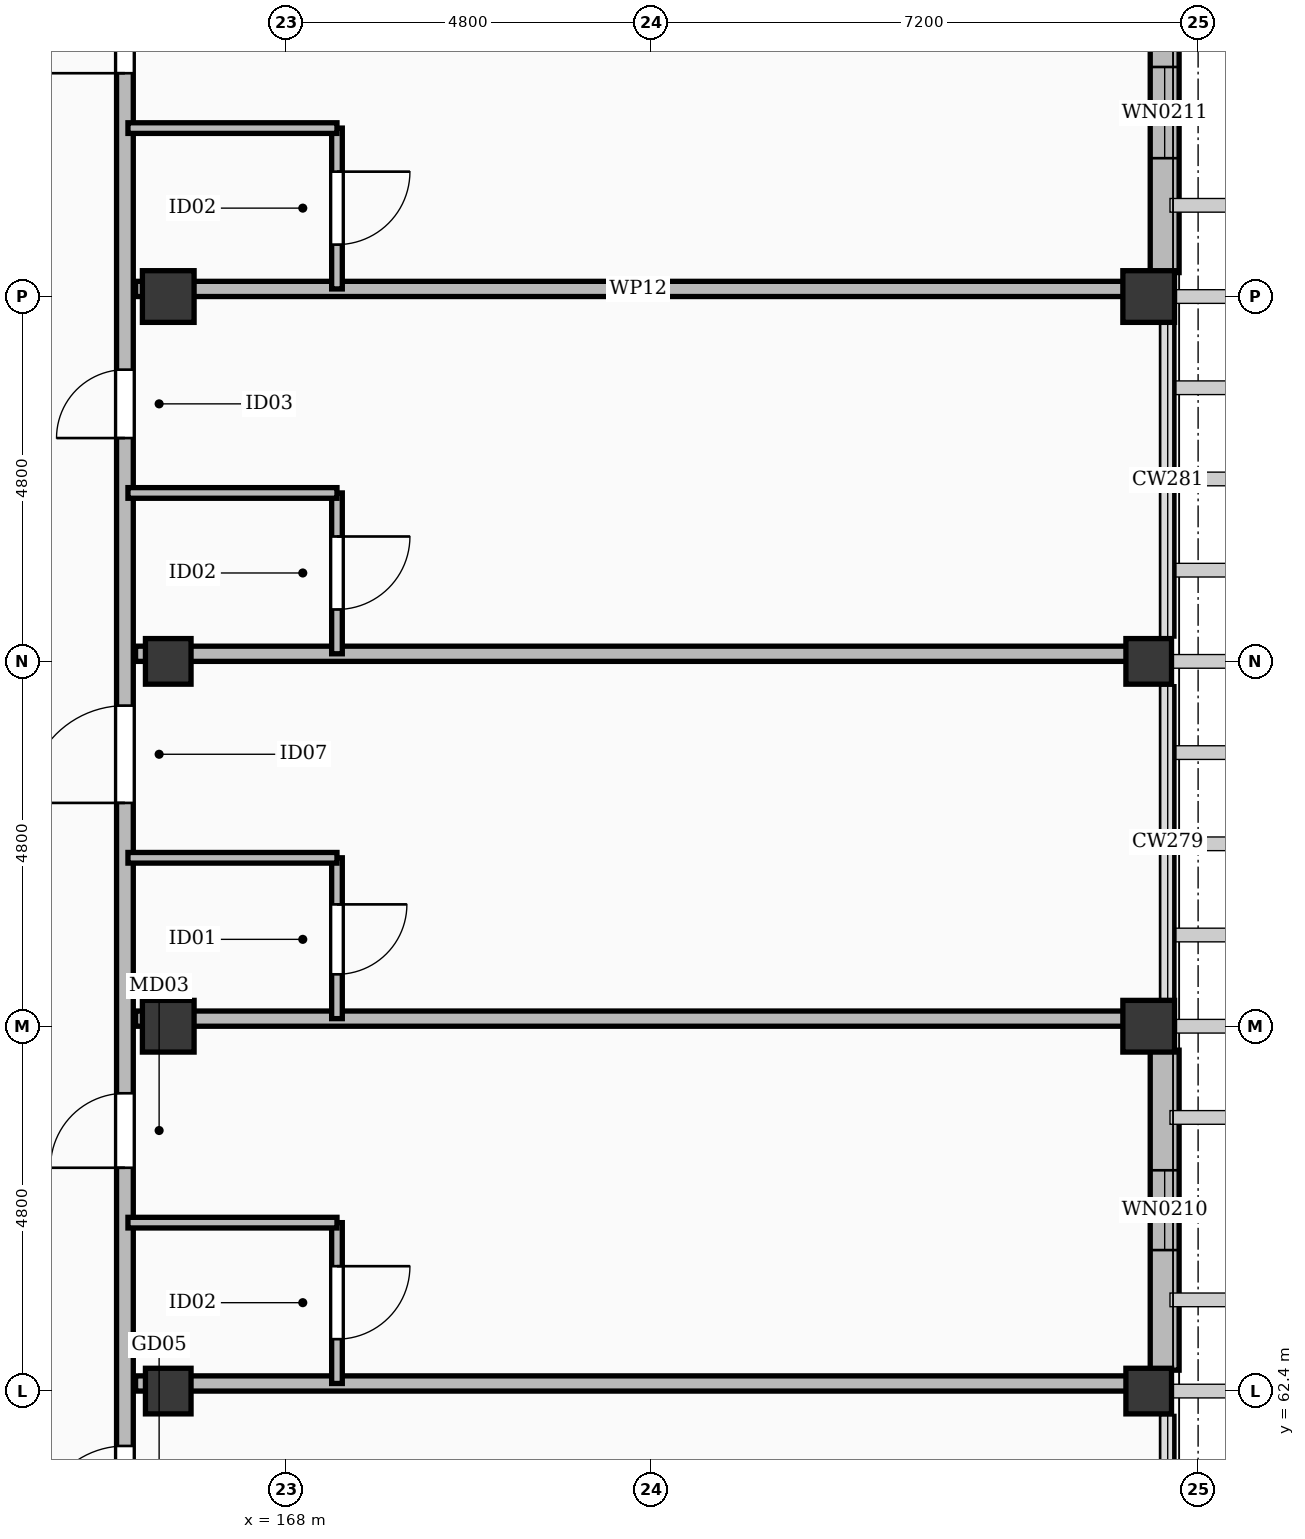
"""IFC4 building model, lengths in metres.
Left out: names, types, materials, properties, quantities, classifications, styles, units other than length and angle.
Written with IfcOpenShell. Run it as: python <this file> out.ifc"""

import sys

from ifc_helpers import new_model, si_unit, direction, frame, frame_2d, origin, origin_2d, place, context, subcontext, project, spatial, rectangle, extrude, element, fill, save


model = new_model("IFC4")
c1 = context("Model", 3, precision=1e-05, world=origin(), true_north=direction((0.0, 1.0)))
c2 = subcontext(c1, "Body", "Model", "MODEL_VIEW")
j1 = project(units=[si_unit("LENGTHUNIT", "METRE"), si_unit("PLANEANGLEUNIT", "RADIAN")], contexts=[c1])
p1 = place(None, origin())
s1 = spatial("IfcSite", under=j1, at=p1, CompositionType="ELEMENT")
p2 = place(p1, origin())
s2 = spatial("IfcBuilding", under=s1, at=p2, CompositionType="ELEMENT")
p3 = place(p2, frame((0.0, 0.0, 35.4)))
s3 = spatial("IfcBuildingStorey", under=s2, at=p3, CompositionType="ELEMENT", Elevation=35.4)
for number, where, z_axis, x_axis in (
    (1, (166.45, 67.2, 0.0), (0.0, 0.0, 1.0), (1.0, 0.0, 0.0)),
    (2, (166.45, 76.8, 0.0), (0.0, 0.0, 1.0), (1.0, 0.0, 0.0)),
    (3, (179.35, 67.2, 0.0), (0.0, 0.0, 1.0), (1.0, 0.0, 0.0)),
    (4, (179.35, 76.8, 0.0), (0.0, 0.0, 1.0), (1.0, 0.0, 0.0)),
):
    element("IfcColumn", number, at=place(p3, frame(where, z_axis=z_axis, x_axis=x_axis)), inside=s3, PredefinedType="COLUMN", context=c2, shape_type="SweptSolid", body=[
        extrude(rectangle(XDim=0.68, YDim=0.68, at=origin_2d()), origin(), (0.0, 0.0, 1.0), 3.6),
    ])
for number, where, z_axis, x_axis in (
    (5, (166.45, 62.4, 0.0), (0.0, 0.0, 1.0), (1.0, 0.0, 0.0)),
    (6, (166.45, 72.0, 0.0), (0.0, 0.0, 1.0), (1.0, 0.0, 0.0)),
    (7, (179.35, 62.4, 0.0), (0.0, 0.0, 1.0), (1.0, 0.0, 0.0)),
    (8, (179.35, 72.0, 0.0), (0.0, 0.0, 1.0), (1.0, 0.0, 0.0)),
):
    element("IfcColumn", number, at=place(p3, frame(where, z_axis=z_axis, x_axis=x_axis)), inside=s3, PredefinedType="COLUMN", context=c2, shape_type="SweptSolid", body=[
        extrude(rectangle(XDim=0.6, YDim=0.6, at=origin_2d()), origin(), (0.0, 0.0, 1.0), 3.6),
    ])
p4 = place(p3, frame((179.56, 66.885, 0.0), z_axis=(0.0, 0.0, 1.0), x_axis=(0.0, -1.0, 0.0)))
e9 = element("IfcWall", 9, at=p4, inside=s3, PredefinedType="SOLIDWALL", context=c2, shape_type="SweptSolid", body=[
    extrude(rectangle(XDim=4.21, YDim=0.38, at=frame_2d((2.105, 0.0))), origin(), (0.0, 0.0, 1.0), 2.602),
])
p5 = place(p4, frame((1.58, 0.0, 0.55)))
e10 = element("IfcOpeningElement", 10, at=p5, cuts=e9, PredefinedType="OPENING", context=c2, shape_type="SweptSolid", body=[
    extrude(rectangle(XDim=1.05, YDim=1.65, at=frame_2d((0.525, 0.825))), frame((0.0, 0.202, 0.0), z_axis=(0.0, -1.0, 0.0), x_axis=(1.0, 0.0, 0.0)), (0.0, 0.0, 1.0), 0.404),
])
p6 = place(p3, frame((179.56, 81.325, 0.0), z_axis=(0.0, 0.0, 1.0), x_axis=(0.0, -1.0, 0.0)))
e11 = element("IfcWall", 11, at=p6, inside=s3, PredefinedType="SOLIDWALL", context=c2, shape_type="SweptSolid", body=[
    extrude(rectangle(XDim=4.21, YDim=0.38, at=frame_2d((2.105, 0.0))), origin(), (0.0, 0.0, 1.0), 2.602),
])
p7 = place(p6, frame((1.505, 0.0, 0.55)))
e12 = element("IfcOpeningElement", 12, at=p7, cuts=e11, PredefinedType="OPENING", context=c2, shape_type="SweptSolid", body=[
    extrude(rectangle(XDim=1.2, YDim=1.72, at=frame_2d((0.6, 0.86))), frame((0.0, 0.202, 0.0), z_axis=(0.0, -1.0, 0.0), x_axis=(1.0, 0.0, 0.0)), (0.0, 0.0, 1.0), 0.404),
])
p8 = place(p3, frame((165.88, 53.15, 0.0), z_axis=(0.0, 0.0, 1.0), x_axis=(0.0, 1.0, 0.0)))
e13 = element("IfcWall", 13, at=p8, inside=s3, PredefinedType="PARTITIONING", context=c2, shape_type="SweptSolid", body=[
    extrude(rectangle(XDim=72.5, YDim=0.22, at=frame_2d((36.25, 0.0))), origin(), (0.0, 0.0, 1.0), 2.602),
])
p9 = place(p8, frame((0.691, 0.0, 0.0)))
e14 = element("IfcOpeningElement", 14, at=p9, cuts=e13, PredefinedType="OPENING", context=c2, shape_type="SweptSolid", body=[
    extrude(rectangle(XDim=1.02, YDim=2.2, at=frame_2d((0.51, 1.1))), frame((0.0, 0.122, 0.0), z_axis=(0.0, -1.0, 0.0), x_axis=(1.0, 0.0, 0.0)), (0.0, 0.0, 1.0), 0.244),
])
p10 = place(p8, frame((7.388, 0.0, 0.0)))
e15 = element("IfcOpeningElement", 15, at=p10, cuts=e13, PredefinedType="OPENING", context=c2, shape_type="SweptSolid", body=[
    extrude(rectangle(XDim=1.14, YDim=2.26, at=frame_2d((0.57, 1.13))), frame((0.0, 0.122, 0.0), z_axis=(0.0, -1.0, 0.0), x_axis=(1.0, 0.0, 0.0)), (0.0, 0.0, 1.0), 0.244),
])
p11 = place(p8, frame((12.188, 0.0, 0.0)))
e16 = element("IfcOpeningElement", 16, at=p11, cuts=e13, PredefinedType="OPENING", context=c2, shape_type="SweptSolid", body=[
    extrude(rectangle(XDim=0.98, YDim=2.15, at=frame_2d((0.49, 1.075))), frame((0.0, 0.122, 0.0), z_axis=(0.0, -1.0, 0.0), x_axis=(1.0, 0.0, 0.0)), (0.0, 0.0, 1.0), 0.244),
])
p12 = place(p8, frame((16.988, 0.0, 0.0)))
e17 = element("IfcOpeningElement", 17, at=p12, cuts=e13, PredefinedType="OPENING", context=c2, shape_type="SweptSolid", body=[
    extrude(rectangle(XDim=1.28, YDim=2.16, at=frame_2d((0.64, 1.08))), frame((0.0, 0.122, 0.0), z_axis=(0.0, -1.0, 0.0), x_axis=(1.0, 0.0, 0.0)), (0.0, 0.0, 1.0), 0.244),
])
p13 = place(p8, frame((21.788, 0.0, 0.0)))
e18 = element("IfcOpeningElement", 18, at=p13, cuts=e13, PredefinedType="OPENING", context=c2, shape_type="SweptSolid", body=[
    extrude(rectangle(XDim=0.9, YDim=2.08, at=frame_2d((0.45, 1.04))), frame((0.0, 0.122, 0.0), z_axis=(0.0, -1.0, 0.0), x_axis=(1.0, 0.0, 0.0)), (0.0, 0.0, 1.0), 0.244),
])
p14 = place(p8, frame((26.588, 0.0, 0.0)))
e19 = element("IfcOpeningElement", 19, at=p14, cuts=e13, PredefinedType="OPENING", context=c2, shape_type="SweptSolid", body=[
    extrude(rectangle(XDim=1.05, YDim=2.22, at=frame_2d((0.525, 1.11))), frame((0.0, 0.122, 0.0), z_axis=(0.0, -1.0, 0.0), x_axis=(1.0, 0.0, 0.0)), (0.0, 0.0, 1.0), 0.244),
])
p15 = place(p8, frame((31.388, 0.0, 0.0)))
e20 = element("IfcOpeningElement", 20, at=p15, cuts=e13, PredefinedType="OPENING", context=c2, shape_type="SweptSolid", body=[
    extrude(rectangle(XDim=1.02, YDim=2.2, at=frame_2d((0.51, 1.1))), frame((0.0, 0.122, 0.0), z_axis=(0.0, -1.0, 0.0), x_axis=(1.0, 0.0, 0.0)), (0.0, 0.0, 1.0), 0.244),
])
p16 = place(p8, frame((36.188, 0.0, 0.0)))
e21 = element("IfcOpeningElement", 21, at=p16, cuts=e13, PredefinedType="OPENING", context=c2, shape_type="SweptSolid", body=[
    extrude(rectangle(XDim=1.14, YDim=2.26, at=frame_2d((0.57, 1.13))), frame((0.0, 0.122, 0.0), z_axis=(0.0, -1.0, 0.0), x_axis=(1.0, 0.0, 0.0)), (0.0, 0.0, 1.0), 0.244),
])
p17 = place(p8, frame((40.988, 0.0, 0.0)))
e22 = element("IfcOpeningElement", 22, at=p17, cuts=e13, PredefinedType="OPENING", context=c2, shape_type="SweptSolid", body=[
    extrude(rectangle(XDim=0.98, YDim=2.15, at=frame_2d((0.49, 1.075))), frame((0.0, 0.122, 0.0), z_axis=(0.0, -1.0, 0.0), x_axis=(1.0, 0.0, 0.0)), (0.0, 0.0, 1.0), 0.244),
])
p18 = place(p8, frame((45.788, 0.0, 0.0)))
e23 = element("IfcOpeningElement", 23, at=p18, cuts=e13, PredefinedType="OPENING", context=c2, shape_type="SweptSolid", body=[
    extrude(rectangle(XDim=1.28, YDim=2.16, at=frame_2d((0.64, 1.08))), frame((0.0, 0.122, 0.0), z_axis=(0.0, -1.0, 0.0), x_axis=(1.0, 0.0, 0.0)), (0.0, 0.0, 1.0), 0.244),
])
p19 = place(p8, frame((50.588, 0.0, 0.0)))
e24 = element("IfcOpeningElement", 24, at=p19, cuts=e13, PredefinedType="OPENING", context=c2, shape_type="SweptSolid", body=[
    extrude(rectangle(XDim=0.9, YDim=2.08, at=frame_2d((0.45, 1.04))), frame((0.0, 0.122, 0.0), z_axis=(0.0, -1.0, 0.0), x_axis=(1.0, 0.0, 0.0)), (0.0, 0.0, 1.0), 0.244),
])
p20 = place(p8, frame((55.388, 0.0, 0.0)))
e25 = element("IfcOpeningElement", 25, at=p20, cuts=e13, PredefinedType="OPENING", context=c2, shape_type="SweptSolid", body=[
    extrude(rectangle(XDim=1.05, YDim=2.22, at=frame_2d((0.525, 1.11))), frame((0.0, 0.122, 0.0), z_axis=(0.0, -1.0, 0.0), x_axis=(1.0, 0.0, 0.0)), (0.0, 0.0, 1.0), 0.244),
])
p21 = place(p8, frame((60.188, 0.0, 0.0)))
e26 = element("IfcOpeningElement", 26, at=p21, cuts=e13, PredefinedType="OPENING", context=c2, shape_type="SweptSolid", body=[
    extrude(rectangle(XDim=1.02, YDim=2.2, at=frame_2d((0.51, 1.1))), frame((0.0, 0.122, 0.0), z_axis=(0.0, -1.0, 0.0), x_axis=(1.0, 0.0, 0.0)), (0.0, 0.0, 1.0), 0.244),
])
p22 = place(p8, frame((64.988, 0.0, 0.0)))
e27 = element("IfcOpeningElement", 27, at=p22, cuts=e13, PredefinedType="OPENING", context=c2, shape_type="SweptSolid", body=[
    extrude(rectangle(XDim=1.14, YDim=2.26, at=frame_2d((0.57, 1.13))), frame((0.0, 0.122, 0.0), z_axis=(0.0, -1.0, 0.0), x_axis=(1.0, 0.0, 0.0)), (0.0, 0.0, 1.0), 0.244),
])
p23 = place(p8, frame((69.788, 0.0, 0.0)))
e28 = element("IfcOpeningElement", 28, at=p23, cuts=e13, PredefinedType="OPENING", context=c2, shape_type="SweptSolid", body=[
    extrude(rectangle(XDim=0.98, YDim=2.15, at=frame_2d((0.49, 1.075))), frame((0.0, 0.122, 0.0), z_axis=(0.0, -1.0, 0.0), x_axis=(1.0, 0.0, 0.0)), (0.0, 0.0, 1.0), 0.244),
])
p24 = place(p3, frame((166.02, 62.5, 0.0), z_axis=(0.0, 0.0, 1.0), x_axis=(1.0, 0.0, 0.0)))
e29 = element("IfcWall", 29, at=p24, inside=s3, PredefinedType="PARTITIONING", context=c2, shape_type="SweptSolid", body=[
    extrude(rectangle(XDim=13.23, YDim=0.2, at=frame_2d((6.615, 0.0))), origin(), (0.0, 0.0, 1.0), 2.602),
])
p25 = place(p3, frame((168.67, 62.5, 0.0), z_axis=(0.0, 0.0, 1.0), x_axis=(0.0, 1.0, 0.0)))
e30 = element("IfcWall", 30, at=p25, inside=s3, PredefinedType="PARTITIONING", context=c2, shape_type="SweptSolid", body=[
    extrude(rectangle(XDim=2.116, YDim=0.14, at=frame_2d((1.058, 0.0))), origin(), (0.0, 0.0, 1.0), 2.732),
])
p26 = place(p25, frame((0.583, 0.0, 0.0)))
e31 = element("IfcOpeningElement", 31, at=p26, cuts=e30, PredefinedType="OPENING", context=c2, shape_type="SweptSolid", body=[
    extrude(rectangle(XDim=0.96, YDim=2.12, at=frame_2d((0.48, 1.06))), frame((0.0, 0.082, 0.0), z_axis=(0.0, -1.0, 0.0), x_axis=(1.0, 0.0, 0.0)), (0.0, 0.0, 1.0), 0.164),
])
p27 = place(p3, frame((165.92, 64.616, 0.0), z_axis=(0.0, 0.0, 1.0), x_axis=(1.0, 0.0, 0.0)))
e32 = element("IfcWall", 32, at=p27, inside=s3, PredefinedType="PARTITIONING", context=c2, shape_type="SweptSolid", body=[
    extrude(rectangle(XDim=2.75, YDim=0.14, at=frame_2d((1.375, 0.0))), origin(), (0.0, 0.0, 1.0), 2.732),
])
p28 = place(p3, frame((166.02, 67.3, 0.0), z_axis=(0.0, 0.0, 1.0), x_axis=(1.0, 0.0, 0.0)))
e33 = element("IfcWall", 33, at=p28, inside=s3, PredefinedType="PARTITIONING", context=c2, shape_type="SweptSolid", body=[
    extrude(rectangle(XDim=13.23, YDim=0.2, at=frame_2d((6.615, 0.0))), origin(), (0.0, 0.0, 1.0), 2.602),
])
p29 = place(p3, frame((168.67, 67.3, 0.0), z_axis=(0.0, 0.0, 1.0), x_axis=(0.0, 1.0, 0.0)))
e34 = element("IfcWall", 34, at=p29, inside=s3, PredefinedType="PARTITIONING", context=c2, shape_type="SweptSolid", body=[
    extrude(rectangle(XDim=2.116, YDim=0.14, at=frame_2d((1.058, 0.0))), origin(), (0.0, 0.0, 1.0), 2.732),
])
p30 = place(p29, frame((0.583, 0.0, 0.0)))
e35 = element("IfcOpeningElement", 35, at=p30, cuts=e34, PredefinedType="OPENING", context=c2, shape_type="SweptSolid", body=[
    extrude(rectangle(XDim=0.92, YDim=2.1, at=frame_2d((0.46, 1.05))), frame((0.0, 0.082, 0.0), z_axis=(0.0, -1.0, 0.0), x_axis=(1.0, 0.0, 0.0)), (0.0, 0.0, 1.0), 0.164),
])
p31 = place(p3, frame((165.92, 69.416, 0.0), z_axis=(0.0, 0.0, 1.0), x_axis=(1.0, 0.0, 0.0)))
e36 = element("IfcWall", 36, at=p31, inside=s3, PredefinedType="PARTITIONING", context=c2, shape_type="SweptSolid", body=[
    extrude(rectangle(XDim=2.75, YDim=0.14, at=frame_2d((1.375, 0.0))), origin(), (0.0, 0.0, 1.0), 2.732),
])
p32 = place(p3, frame((166.02, 72.1, 0.0), z_axis=(0.0, 0.0, 1.0), x_axis=(1.0, 0.0, 0.0)))
e37 = element("IfcWall", 37, at=p32, inside=s3, PredefinedType="PARTITIONING", context=c2, shape_type="SweptSolid", body=[
    extrude(rectangle(XDim=13.23, YDim=0.2, at=frame_2d((6.615, 0.0))), origin(), (0.0, 0.0, 1.0), 2.602),
])
p33 = place(p3, frame((168.67, 72.1, 0.0), z_axis=(0.0, 0.0, 1.0), x_axis=(0.0, 1.0, 0.0)))
e38 = element("IfcWall", 38, at=p33, inside=s3, PredefinedType="PARTITIONING", context=c2, shape_type="SweptSolid", body=[
    extrude(rectangle(XDim=2.116, YDim=0.14, at=frame_2d((1.058, 0.0))), origin(), (0.0, 0.0, 1.0), 2.732),
])
p34 = place(p33, frame((0.583, 0.0, 0.0)))
e39 = element("IfcOpeningElement", 39, at=p34, cuts=e38, PredefinedType="OPENING", context=c2, shape_type="SweptSolid", body=[
    extrude(rectangle(XDim=0.96, YDim=2.12, at=frame_2d((0.48, 1.06))), frame((0.0, 0.082, 0.0), z_axis=(0.0, -1.0, 0.0), x_axis=(1.0, 0.0, 0.0)), (0.0, 0.0, 1.0), 0.164),
])
p35 = place(p3, frame((165.92, 74.216, 0.0), z_axis=(0.0, 0.0, 1.0), x_axis=(1.0, 0.0, 0.0)))
e40 = element("IfcWall", 40, at=p35, inside=s3, PredefinedType="PARTITIONING", context=c2, shape_type="SweptSolid", body=[
    extrude(rectangle(XDim=2.75, YDim=0.14, at=frame_2d((1.375, 0.0))), origin(), (0.0, 0.0, 1.0), 2.732),
])
p36 = place(p3, frame((166.02, 76.9, 0.0), z_axis=(0.0, 0.0, 1.0), x_axis=(1.0, 0.0, 0.0)))
e41 = element("IfcWall", 41, at=p36, inside=s3, PredefinedType="PARTITIONING", context=c2, shape_type="SweptSolid", body=[
    extrude(rectangle(XDim=13.23, YDim=0.2, at=frame_2d((6.615, 0.0))), origin(), (0.0, 0.0, 1.0), 2.602),
])
p37 = place(p3, frame((168.67, 76.9, 0.0), z_axis=(0.0, 0.0, 1.0), x_axis=(0.0, 1.0, 0.0)))
e42 = element("IfcWall", 42, at=p37, inside=s3, PredefinedType="PARTITIONING", context=c2, shape_type="SweptSolid", body=[
    extrude(rectangle(XDim=2.116, YDim=0.14, at=frame_2d((1.058, 0.0))), origin(), (0.0, 0.0, 1.0), 2.732),
])
p38 = place(p37, frame((0.583, 0.0, 0.0)))
e43 = element("IfcOpeningElement", 43, at=p38, cuts=e42, PredefinedType="OPENING", context=c2, shape_type="SweptSolid", body=[
    extrude(rectangle(XDim=0.96, YDim=2.12, at=frame_2d((0.48, 1.06))), frame((0.0, 0.082, 0.0), z_axis=(0.0, -1.0, 0.0), x_axis=(1.0, 0.0, 0.0)), (0.0, 0.0, 1.0), 0.164),
])
p39 = place(p3, frame((165.92, 79.016, 0.0), z_axis=(0.0, 0.0, 1.0), x_axis=(1.0, 0.0, 0.0)))
e44 = element("IfcWall", 44, at=p39, inside=s3, PredefinedType="PARTITIONING", context=c2, shape_type="SweptSolid", body=[
    extrude(rectangle(XDim=2.75, YDim=0.14, at=frame_2d((1.375, 0.0))), origin(), (0.0, 0.0, 1.0), 2.732),
])
p40 = place(p5, origin())
e45 = element("IfcWindow", 45, at=p40, inside=s3, PartitioningType="SINGLE_PANEL", PredefinedType="WINDOW", context=c2, shape_type="SweptSolid", body=[
    extrude(rectangle(XDim=1.05, YDim=1.65, at=frame_2d((0.525, 0.825))), frame((0.0, 0.03, 0.0), z_axis=(0.0, -1.0, 0.0), x_axis=(1.0, 0.0, 0.0)), (0.0, 0.0, 1.0), 0.06),
])
fill(e10, e45)
p41 = place(p7, origin())
e46 = element("IfcWindow", 46, at=p41, inside=s3, PartitioningType="SINGLE_PANEL", PredefinedType="WINDOW", context=c2, shape_type="SweptSolid", body=[
    extrude(rectangle(XDim=1.2, YDim=1.72, at=frame_2d((0.6, 0.86))), frame((0.0, 0.03, 0.0), z_axis=(0.0, -1.0, 0.0), x_axis=(1.0, 0.0, 0.0)), (0.0, 0.0, 1.0), 0.06),
])
fill(e12, e46)
p42 = place(p10, origin())
e47 = element("IfcDoor", 47, at=p42, inside=s3, OperationType="SINGLE_SWING_LEFT", PredefinedType="DOOR", context=c2, shape_type="SweptSolid", body=[
    extrude(rectangle(XDim=1.14, YDim=2.26, at=frame_2d((0.57, 1.13))), frame((0.0, 0.025, 0.0), z_axis=(0.0, -1.0, 0.0), x_axis=(1.0, 0.0, 0.0)), (0.0, 0.0, 1.0), 0.05),
])
fill(e15, e47)
p43 = place(p11, origin())
e48 = element("IfcDoor", 48, at=p43, inside=s3, OperationType="SINGLE_SWING_LEFT", PredefinedType="DOOR", context=c2, shape_type="SweptSolid", body=[
    extrude(rectangle(XDim=0.98, YDim=2.15, at=frame_2d((0.49, 1.075))), frame((0.0, 0.025, 0.0), z_axis=(0.0, -1.0, 0.0), x_axis=(1.0, 0.0, 0.0)), (0.0, 0.0, 1.0), 0.05),
])
fill(e16, e48)
p44 = place(p26, frame((0.96, 0.0, 0.0), z_axis=(0.0, 0.0, 1.0), x_axis=(-1.0, 0.0, 0.0)))
e49 = element("IfcDoor", 49, at=p44, inside=s3, OperationType="SINGLE_SWING_RIGHT", PredefinedType="DOOR", context=c2, shape_type="SweptSolid", body=[
    extrude(rectangle(XDim=0.96, YDim=2.12, at=frame_2d((0.48, 1.06))), frame((0.0, 0.025, 0.0), z_axis=(0.0, -1.0, 0.0), x_axis=(1.0, 0.0, 0.0)), (0.0, 0.0, 1.0), 0.05),
])
fill(e31, e49)
p45 = place(p12, origin())
e50 = element("IfcDoor", 50, at=p45, inside=s3, OperationType="SINGLE_SWING_LEFT", PredefinedType="DOOR", context=c2, shape_type="SweptSolid", body=[
    extrude(rectangle(XDim=1.28, YDim=2.16, at=frame_2d((0.64, 1.08))), frame((0.0, 0.025, 0.0), z_axis=(0.0, -1.0, 0.0), x_axis=(1.0, 0.0, 0.0)), (0.0, 0.0, 1.0), 0.05),
])
fill(e17, e50)
p46 = place(p30, frame((0.92, 0.0, 0.0), z_axis=(0.0, 0.0, 1.0), x_axis=(-1.0, 0.0, 0.0)))
e51 = element("IfcDoor", 51, at=p46, inside=s3, OperationType="SINGLE_SWING_RIGHT", PredefinedType="DOOR", context=c2, shape_type="SweptSolid", body=[
    extrude(rectangle(XDim=0.92, YDim=2.1, at=frame_2d((0.46, 1.05))), frame((0.0, 0.025, 0.0), z_axis=(0.0, -1.0, 0.0), x_axis=(1.0, 0.0, 0.0)), (0.0, 0.0, 1.0), 0.05),
])
fill(e35, e51)
p47 = place(p13, origin())
e52 = element("IfcDoor", 52, at=p47, inside=s3, OperationType="SINGLE_SWING_LEFT", PredefinedType="DOOR", context=c2, shape_type="SweptSolid", body=[
    extrude(rectangle(XDim=0.9, YDim=2.08, at=frame_2d((0.45, 1.04))), frame((0.0, 0.025, 0.0), z_axis=(0.0, -1.0, 0.0), x_axis=(1.0, 0.0, 0.0)), (0.0, 0.0, 1.0), 0.05),
])
fill(e18, e52)
p48 = place(p34, frame((0.96, 0.0, 0.0), z_axis=(0.0, 0.0, 1.0), x_axis=(-1.0, 0.0, 0.0)))
e53 = element("IfcDoor", 53, at=p48, inside=s3, OperationType="SINGLE_SWING_RIGHT", PredefinedType="DOOR", context=c2, shape_type="SweptSolid", body=[
    extrude(rectangle(XDim=0.96, YDim=2.12, at=frame_2d((0.48, 1.06))), frame((0.0, 0.025, 0.0), z_axis=(0.0, -1.0, 0.0), x_axis=(1.0, 0.0, 0.0)), (0.0, 0.0, 1.0), 0.05),
])
fill(e39, e53)
p49 = place(p14, origin())
e54 = element("IfcDoor", 54, at=p49, inside=s3, OperationType="SINGLE_SWING_LEFT", PredefinedType="DOOR", context=c2, shape_type="SweptSolid", body=[
    extrude(rectangle(XDim=1.05, YDim=2.22, at=frame_2d((0.525, 1.11))), frame((0.0, 0.025, 0.0), z_axis=(0.0, -1.0, 0.0), x_axis=(1.0, 0.0, 0.0)), (0.0, 0.0, 1.0), 0.05),
])
fill(e19, e54)
p50 = place(p38, frame((0.96, 0.0, 0.0), z_axis=(0.0, 0.0, 1.0), x_axis=(-1.0, 0.0, 0.0)))
e55 = element("IfcDoor", 55, at=p50, inside=s3, OperationType="SINGLE_SWING_RIGHT", PredefinedType="DOOR", context=c2, shape_type="SweptSolid", body=[
    extrude(rectangle(XDim=0.96, YDim=2.12, at=frame_2d((0.48, 1.06))), frame((0.0, 0.025, 0.0), z_axis=(0.0, -1.0, 0.0), x_axis=(1.0, 0.0, 0.0)), (0.0, 0.0, 1.0), 0.05),
])
fill(e43, e55)
save(model, sys.argv[1])
